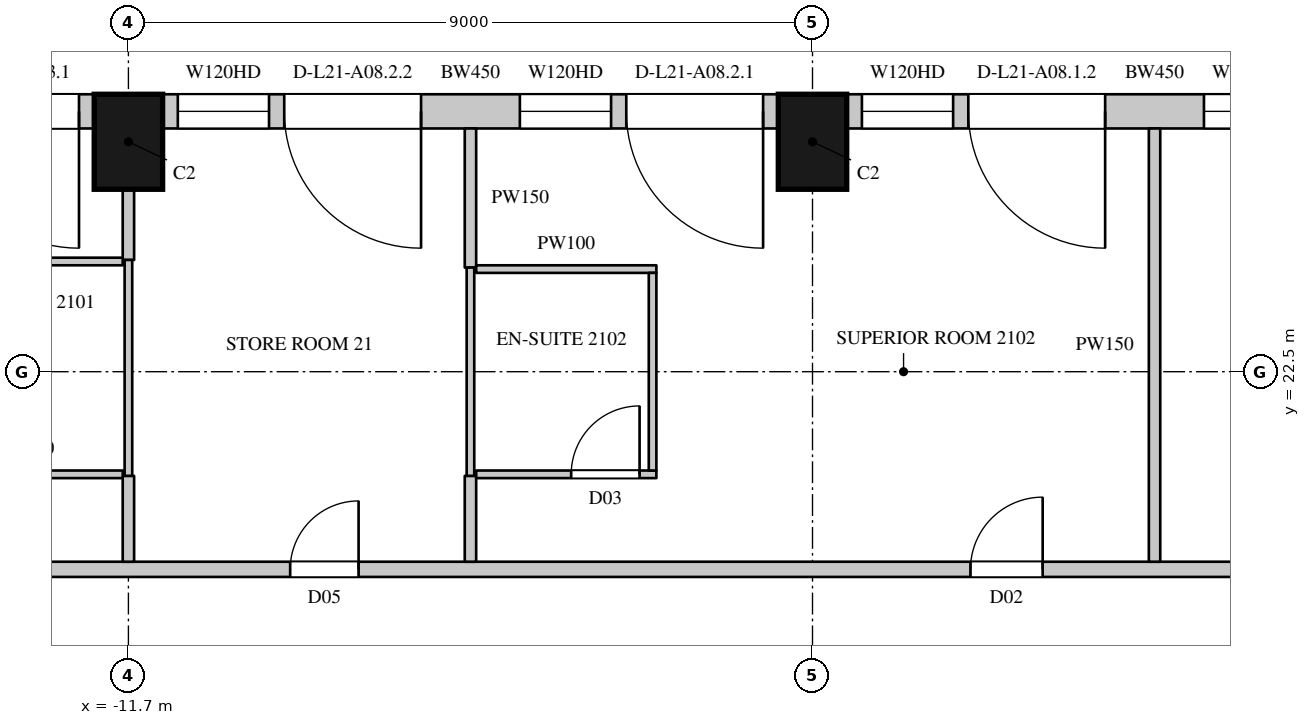
"""IFC4 building model, lengths in metres.
Left out: names, types, materials, properties, quantities, classifications, styles, units other than length and angle.
Written with IfcOpenShell. Run it as: python <this file> out.ifc"""

import sys

from ifc_helpers import new_model, si_unit, direction, frame, frame_2d, origin, origin_2d, place, context, subcontext, project, spatial, rectangle, extrude, element, fill, save


model = new_model("IFC4")
c1 = context("Model", 3, precision=1e-05, world=origin(), true_north=direction((0.0, 1.0)))
c2 = subcontext(c1, "Body", "Model", "MODEL_VIEW")
j1 = project(units=[si_unit("LENGTHUNIT", "METRE"), si_unit("PLANEANGLEUNIT", "RADIAN")], contexts=[c1])
p1 = place(None, origin())
s1 = spatial("IfcSite", under=j1, at=p1, CompositionType="ELEMENT")
p2 = place(p1, origin())
s2 = spatial("IfcBuilding", under=s1, at=p2, CompositionType="ELEMENT")
p3 = place(p2, frame((0.0, 0.0, 105.9)))
s3 = spatial("IfcBuildingStorey", under=s2, at=p3, CompositionType="ELEMENT", Elevation=105.9)
for number, where, z_axis, x_axis in (
    (1, (-2.7, 25.525, 0.0), (0.0, 0.0, 1.0), (-1.0, 0.0, 0.0)),
    (2, (-11.7, 25.525, 0.0), (0.0, 0.0, 1.0), (-1.0, 0.0, 0.0)),
):
    element("IfcColumn", number, at=place(p3, frame(where, z_axis=z_axis, x_axis=x_axis)), inside=s3, PredefinedType="COLUMN", context=c2, shape_type="SweptSolid", body=[
        extrude(rectangle(XDim=0.9, YDim=1.25, at=origin_2d()), origin(), (0.0, 0.0, 1.0), 3.6),
    ])
p4 = place(p3, frame((5.85, 25.925, 0.0), z_axis=(0.0, 0.0, 1.0), x_axis=(-1.0, 0.0, 0.0)))
e3 = element("IfcWall", 3, at=p4, inside=s3, PredefinedType="SOLIDWALL", context=c2, shape_type="SweptSolid", body=[
    extrude(rectangle(XDim=8.1, YDim=0.45, at=frame_2d((4.05, 0.0))), origin(), (0.0, 0.0, 1.0), 3.3),
])
p5 = place(p4, frame((0.2, 0.0, 0.0)))
e4 = element("IfcOpeningElement", 4, at=p5, cuts=e3, PredefinedType="OPENING", context=c2, shape_type="SweptSolid", body=[
    extrude(rectangle(XDim=1.8, YDim=2.4, at=frame_2d((0.9, 1.2))), frame((0.0, 0.235, 0.0), z_axis=(0.0, -1.0, 0.0), x_axis=(1.0, 0.0, 0.0)), (0.0, 0.0, 1.0), 0.47),
])
p6 = place(p4, frame((2.2, 0.0, 1.05)))
e5 = element("IfcOpeningElement", 5, at=p6, cuts=e3, PredefinedType="OPENING", context=c2, shape_type="SweptSolid", body=[
    extrude(rectangle(XDim=1.2, YDim=2.0, at=frame_2d((0.6, 1.0))), frame((0.0, 0.235, 0.0), z_axis=(0.0, -1.0, 0.0), x_axis=(1.0, 0.0, 0.0)), (0.0, 0.0, 1.0), 0.47),
])
p7 = place(p4, frame((4.7, 0.0, 0.0)))
e6 = element("IfcOpeningElement", 6, at=p7, cuts=e3, PredefinedType="OPENING", context=c2, shape_type="SweptSolid", body=[
    extrude(rectangle(XDim=1.8, YDim=2.4, at=frame_2d((0.9, 1.2))), frame((0.0, 0.235, 0.0), z_axis=(0.0, -1.0, 0.0), x_axis=(1.0, 0.0, 0.0)), (0.0, 0.0, 1.0), 0.47),
])
p8 = place(p4, frame((6.7, 0.0, 1.05)))
e7 = element("IfcOpeningElement", 7, at=p8, cuts=e3, PredefinedType="OPENING", context=c2, shape_type="SweptSolid", body=[
    extrude(rectangle(XDim=1.2, YDim=2.0, at=frame_2d((0.6, 1.0))), frame((0.0, 0.235, 0.0), z_axis=(0.0, -1.0, 0.0), x_axis=(1.0, 0.0, 0.0)), (0.0, 0.0, 1.0), 0.47),
])
p9 = place(p3, frame((-3.15, 25.925, 0.0), z_axis=(0.0, 0.0, 1.0), x_axis=(-1.0, 0.0, 0.0)))
e8 = element("IfcWall", 8, at=p9, inside=s3, PredefinedType="SOLIDWALL", context=c2, shape_type="SweptSolid", body=[
    extrude(rectangle(XDim=8.1, YDim=0.45, at=frame_2d((4.05, 0.0))), origin(), (0.0, 0.0, 1.0), 3.3),
])
p10 = place(p9, frame((0.2, 0.0, 0.0)))
e9 = element("IfcOpeningElement", 9, at=p10, cuts=e8, PredefinedType="OPENING", context=c2, shape_type="SweptSolid", body=[
    extrude(rectangle(XDim=1.8, YDim=2.4, at=frame_2d((0.9, 1.2))), frame((0.0, 0.235, 0.0), z_axis=(0.0, -1.0, 0.0), x_axis=(1.0, 0.0, 0.0)), (0.0, 0.0, 1.0), 0.47),
])
p11 = place(p9, frame((2.2, 0.0, 1.05)))
e10 = element("IfcOpeningElement", 10, at=p11, cuts=e8, PredefinedType="OPENING", context=c2, shape_type="SweptSolid", body=[
    extrude(rectangle(XDim=1.2, YDim=2.0, at=frame_2d((0.6, 1.0))), frame((0.0, 0.235, 0.0), z_axis=(0.0, -1.0, 0.0), x_axis=(1.0, 0.0, 0.0)), (0.0, 0.0, 1.0), 0.47),
])
p12 = place(p9, frame((4.7, 0.0, 0.0)))
e11 = element("IfcOpeningElement", 11, at=p12, cuts=e8, PredefinedType="OPENING", context=c2, shape_type="SweptSolid", body=[
    extrude(rectangle(XDim=1.8, YDim=2.4, at=frame_2d((0.9, 1.2))), frame((0.0, 0.235, 0.0), z_axis=(0.0, -1.0, 0.0), x_axis=(1.0, 0.0, 0.0)), (0.0, 0.0, 1.0), 0.47),
])
p13 = place(p9, frame((6.7, 0.0, 1.05)))
e12 = element("IfcOpeningElement", 12, at=p13, cuts=e8, PredefinedType="OPENING", context=c2, shape_type="SweptSolid", body=[
    extrude(rectangle(XDim=1.2, YDim=2.0, at=frame_2d((0.6, 1.0))), frame((0.0, 0.235, 0.0), z_axis=(0.0, -1.0, 0.0), x_axis=(1.0, 0.0, 0.0)), (0.0, 0.0, 1.0), 0.47),
])
p14 = place(p3, frame((-12.15, 25.925, 0.0), z_axis=(0.0, 0.0, 1.0), x_axis=(-1.0, 0.0, 0.0)))
e13 = element("IfcWall", 13, at=p14, inside=s3, PredefinedType="SOLIDWALL", context=c2, shape_type="SweptSolid", body=[
    extrude(rectangle(XDim=8.1, YDim=0.45, at=frame_2d((4.05, 0.0))), origin(), (0.0, 0.0, 1.0), 3.3),
])
p15 = place(p14, frame((0.2, 0.0, 0.0)))
e14 = element("IfcOpeningElement", 14, at=p15, cuts=e13, PredefinedType="OPENING", context=c2, shape_type="SweptSolid", body=[
    extrude(rectangle(XDim=1.8, YDim=2.4, at=frame_2d((0.9, 1.2))), frame((0.0, 0.235, 0.0), z_axis=(0.0, -1.0, 0.0), x_axis=(1.0, 0.0, 0.0)), (0.0, 0.0, 1.0), 0.47),
])
p16 = place(p14, frame((2.2, 0.0, 1.05)))
e15 = element("IfcOpeningElement", 15, at=p16, cuts=e13, PredefinedType="OPENING", context=c2, shape_type="SweptSolid", body=[
    extrude(rectangle(XDim=1.2, YDim=2.0, at=frame_2d((0.6, 1.0))), frame((0.0, 0.235, 0.0), z_axis=(0.0, -1.0, 0.0), x_axis=(1.0, 0.0, 0.0)), (0.0, 0.0, 1.0), 0.47),
])
p17 = place(p14, frame((4.0, 0.0, 0.0)))
e16 = element("IfcOpeningElement", 16, at=p17, cuts=e13, PredefinedType="OPENING", context=c2, shape_type="SweptSolid", body=[
    extrude(rectangle(XDim=1.8, YDim=2.4, at=frame_2d((0.9, 1.2))), frame((0.0, 0.235, 0.0), z_axis=(0.0, -1.0, 0.0), x_axis=(1.0, 0.0, 0.0)), (0.0, 0.0, 1.0), 0.47),
])
p18 = place(p3, frame((-23.822, 19.9, 0.0), z_axis=(0.0, 0.0, 1.0), x_axis=(1.0, 0.0, 0.0)))
e17 = element("IfcWall", 17, at=p18, inside=s3, PredefinedType="PARTITIONING", context=c2, shape_type="SweptSolid", body=[
    extrude(rectangle(XDim=41.605, YDim=0.2, at=frame_2d((20.803, 0.0))), origin(), (0.0, 0.0, 1.0), 3.3),
])
p19 = place(p18, frame((14.25, 0.0, 0.0)))
e18 = element("IfcOpeningElement", 18, at=p19, cuts=e17, PredefinedType="OPENING", context=c2, shape_type="SweptSolid", body=[
    extrude(rectangle(XDim=0.9, YDim=2.2, at=frame_2d((0.45, 1.1))), frame((0.0, 0.11, 0.0), z_axis=(0.0, -1.0, 0.0), x_axis=(1.0, 0.0, 0.0)), (0.0, 0.0, 1.0), 0.22),
])
p20 = place(p18, frame((27.1, 0.0, 0.0)))
e19 = element("IfcOpeningElement", 19, at=p20, cuts=e17, PredefinedType="OPENING", context=c2, shape_type="SweptSolid", body=[
    extrude(rectangle(XDim=0.9, YDim=2.2, at=frame_2d((0.45, 1.1))), frame((0.0, 0.11, 0.0), z_axis=(0.0, -1.0, 0.0), x_axis=(1.0, 0.0, 0.0)), (0.0, 0.0, 1.0), 0.22),
])
p21 = place(p18, frame((0.8, 0.0, 0.0)))
e20 = element("IfcOpeningElement", 20, at=p21, cuts=e17, PredefinedType="OPENING", context=c2, shape_type="SweptSolid", body=[
    extrude(rectangle(XDim=1.1, YDim=2.4, at=frame_2d((0.55, 1.2))), frame((0.0, 0.11, 0.0), z_axis=(0.0, -1.0, 0.0), x_axis=(1.0, 0.0, 0.0)), (0.0, 0.0, 1.0), 0.22),
])
p22 = place(p18, frame((23.2, 0.0, 0.0)))
e21 = element("IfcOpeningElement", 21, at=p22, cuts=e17, PredefinedType="OPENING", context=c2, shape_type="SweptSolid", body=[
    extrude(rectangle(XDim=0.95, YDim=2.2, at=frame_2d((0.475, 1.1))), frame((0.0, 0.11, 0.0), z_axis=(0.0, -1.0, 0.0), x_axis=(1.0, 0.0, 0.0)), (0.0, 0.0, 1.0), 0.22),
])
p23 = place(p18, frame((35.0, 0.0, 0.0)))
e22 = element("IfcOpeningElement", 22, at=p23, cuts=e17, PredefinedType="OPENING", context=c2, shape_type="SweptSolid", body=[
    extrude(rectangle(XDim=0.95, YDim=2.2, at=frame_2d((0.475, 1.1))), frame((0.0, 0.11, 0.0), z_axis=(0.0, -1.0, 0.0), x_axis=(1.0, 0.0, 0.0)), (0.0, 0.0, 1.0), 0.22),
])
p24 = place(p3, frame((-11.7, 20.0, 0.0), z_axis=(0.0, 0.0, 1.0), x_axis=(0.0, 1.0, 0.0)))
e23 = element("IfcWall", 23, at=p24, inside=s3, PredefinedType="PARTITIONING", context=c2, shape_type="SweptSolid", body=[
    extrude(rectangle(XDim=1.13, YDim=0.15, at=frame_2d((0.565, 0.0))), origin(), (0.0, 0.0, 1.0), 2.75),
])
p25 = place(p3, frame((-11.7, 23.97, 0.0), z_axis=(0.0, 0.0, 1.0), x_axis=(0.0, 1.0, 0.0)))
e24 = element("IfcWall", 24, at=p25, inside=s3, PredefinedType="PARTITIONING", context=c2, shape_type="SweptSolid", body=[
    extrude(rectangle(XDim=0.93, YDim=0.15, at=frame_2d((0.465, 0.0))), origin(), (0.0, 0.0, 1.0), 2.75),
])
p26 = place(p3, frame((-7.2, 20.0, 0.0), z_axis=(0.0, 0.0, 1.0), x_axis=(0.0, 1.0, 0.0)))
e25 = element("IfcWall", 25, at=p26, inside=s3, PredefinedType="PARTITIONING", context=c2, shape_type="SweptSolid", body=[
    extrude(rectangle(XDim=1.13, YDim=0.15, at=frame_2d((0.565, 0.0))), origin(), (0.0, 0.0, 1.0), 2.65),
])
p27 = place(p3, frame((-7.2, 23.87, 0.0), z_axis=(0.0, 0.0, 1.0), x_axis=(0.0, 1.0, 0.0)))
e26 = element("IfcWall", 26, at=p27, inside=s3, PredefinedType="PARTITIONING", context=c2, shape_type="SweptSolid", body=[
    extrude(rectangle(XDim=1.83, YDim=0.15, at=frame_2d((0.915, 0.0))), origin(), (0.0, 0.0, 1.0), 2.65),
])
p28 = place(p3, frame((1.8, 20.0, 0.0), z_axis=(0.0, 0.0, 1.0), x_axis=(0.0, 1.0, 0.0)))
e27 = element("IfcWall", 27, at=p28, inside=s3, PredefinedType="PARTITIONING", context=c2, shape_type="SweptSolid", body=[
    extrude(rectangle(XDim=5.7, YDim=0.15, at=frame_2d((2.85, 0.0))), origin(), (0.0, 0.0, 1.0), 2.65),
])
for number, where, z_axis, x_axis in (
    (28, (-14.346, 21.15, 0.0), (0.0, 0.0, 1.0), (1.0, 0.0, 0.0)),
    (29, (-14.346, 23.95, 0.0), (0.0, 0.0, 1.0), (1.0, 0.0, 0.0)),
):
    element("IfcWall", number, at=place(p3, frame(where, z_axis=z_axis, x_axis=x_axis)), inside=s3, PredefinedType="PARTITIONING", context=c2, shape_type="SweptSolid", body=[
        extrude(rectangle(XDim=2.571, YDim=0.1, at=frame_2d((1.286, 0.0))), origin(), (0.0, 0.0, 1.0), 3.3),
    ])
p29 = place(p3, frame((-11.7, 21.13, 0.0), z_axis=(0.0, 0.0, 1.0), x_axis=(0.0, 1.0, 0.0)))
e30 = element("IfcWall", 30, at=p29, inside=s3, PredefinedType="PARTITIONING", context=c2, shape_type="SweptSolid", body=[
    extrude(rectangle(XDim=2.84, YDim=0.1, at=frame_2d((1.42, 0.0))), origin(), (0.0, 0.0, 1.0), 2.75),
])
p30 = place(p3, frame((-7.2, 21.13, 0.0), z_axis=(0.0, 0.0, 1.0), x_axis=(0.0, 1.0, 0.0)))
e31 = element("IfcWall", 31, at=p30, inside=s3, PredefinedType="PARTITIONING", context=c2, shape_type="SweptSolid", body=[
    extrude(rectangle(XDim=2.74, YDim=0.1, at=frame_2d((1.37, 0.0))), origin(), (0.0, 0.0, 1.0), 2.65),
])
p31 = place(p3, frame((-7.125, 21.15, 0.0), z_axis=(0.0, 0.0, 1.0), x_axis=(1.0, 0.0, 0.0)))
e32 = element("IfcWall", 32, at=p31, inside=s3, PredefinedType="PARTITIONING", context=c2, shape_type="SweptSolid", body=[
    extrude(rectangle(XDim=2.371, YDim=0.1, at=frame_2d((1.186, 0.0))), origin(), (0.0, 0.0, 1.0), 3.3),
])
p32 = place(p31, frame((1.25, 0.0, 0.0)))
e33 = element("IfcOpeningElement", 33, at=p32, cuts=e32, PredefinedType="OPENING", context=c2, shape_type="SweptSolid", body=[
    extrude(rectangle(XDim=0.9, YDim=2.2, at=frame_2d((0.45, 1.1))), frame((0.0, 0.06, 0.0), z_axis=(0.0, -1.0, 0.0), x_axis=(1.0, 0.0, 0.0)), (0.0, 0.0, 1.0), 0.12),
])
p33 = place(p3, frame((-7.125, 23.85, 0.0), z_axis=(0.0, 0.0, 1.0), x_axis=(1.0, 0.0, 0.0)))
e34 = element("IfcWall", 34, at=p33, inside=s3, PredefinedType="PARTITIONING", context=c2, shape_type="SweptSolid", body=[
    extrude(rectangle(XDim=2.371, YDim=0.1, at=frame_2d((1.186, 0.0))), origin(), (0.0, 0.0, 1.0), 3.3),
])
p34 = place(p3, frame((-4.804, 21.2, 0.0), z_axis=(0.0, 0.0, 1.0), x_axis=(0.0, 1.0, 0.0)))
e35 = element("IfcWall", 35, at=p34, inside=s3, PredefinedType="PARTITIONING", context=c2, shape_type="SweptSolid", body=[
    extrude(rectangle(XDim=2.6, YDim=0.1, at=frame_2d((1.3, 0.0))), origin(), (0.0, 0.0, 1.0), 3.3),
])
p35 = place(p6, origin())
e36 = element("IfcWindow", 36, at=p35, inside=s3, PartitioningType="SINGLE_PANEL", PredefinedType="WINDOW", context=c2, shape_type="SweptSolid", body=[
    extrude(rectangle(XDim=1.2, YDim=2.0, at=frame_2d((0.6, 1.0))), frame((0.0, 0.135, 0.0), z_axis=(0.0, -1.0, 0.0), x_axis=(1.0, 0.0, 0.0)), (0.0, 0.0, 1.0), 0.06),
])
fill(e5, e36)
p36 = place(p7, origin())
e37 = element("IfcDoor", 37, at=p36, inside=s3, OperationType="SLIDING_TO_LEFT", PredefinedType="DOOR", context=c2, shape_type="SweptSolid", body=[
    extrude(rectangle(XDim=1.8, YDim=2.4, at=frame_2d((0.9, 1.2))), frame((0.0, 0.13, 0.0), z_axis=(0.0, -1.0, 0.0), x_axis=(1.0, 0.0, 0.0)), (0.0, 0.0, 1.0), 0.05),
])
fill(e6, e37)
p37 = place(p8, origin())
e38 = element("IfcWindow", 38, at=p37, inside=s3, PartitioningType="SINGLE_PANEL", PredefinedType="WINDOW", context=c2, shape_type="SweptSolid", body=[
    extrude(rectangle(XDim=1.2, YDim=2.0, at=frame_2d((0.6, 1.0))), frame((0.0, 0.135, 0.0), z_axis=(0.0, -1.0, 0.0), x_axis=(1.0, 0.0, 0.0)), (0.0, 0.0, 1.0), 0.06),
])
fill(e7, e38)
p38 = place(p10, origin())
e39 = element("IfcDoor", 39, at=p38, inside=s3, OperationType="SLIDING_TO_LEFT", PredefinedType="DOOR", context=c2, shape_type="SweptSolid", body=[
    extrude(rectangle(XDim=1.8, YDim=2.4, at=frame_2d((0.9, 1.2))), frame((0.0, 0.13, 0.0), z_axis=(0.0, -1.0, 0.0), x_axis=(1.0, 0.0, 0.0)), (0.0, 0.0, 1.0), 0.05),
])
fill(e9, e39)
p39 = place(p11, origin())
e40 = element("IfcWindow", 40, at=p39, inside=s3, PartitioningType="SINGLE_PANEL", PredefinedType="WINDOW", context=c2, shape_type="SweptSolid", body=[
    extrude(rectangle(XDim=1.2, YDim=2.0, at=frame_2d((0.6, 1.0))), frame((0.0, 0.135, 0.0), z_axis=(0.0, -1.0, 0.0), x_axis=(1.0, 0.0, 0.0)), (0.0, 0.0, 1.0), 0.06),
])
fill(e10, e40)
p40 = place(p12, origin())
e41 = element("IfcDoor", 41, at=p40, inside=s3, OperationType="SLIDING_TO_LEFT", PredefinedType="DOOR", context=c2, shape_type="SweptSolid", body=[
    extrude(rectangle(XDim=1.8, YDim=2.4, at=frame_2d((0.9, 1.2))), frame((0.0, 0.13, 0.0), z_axis=(0.0, -1.0, 0.0), x_axis=(1.0, 0.0, 0.0)), (0.0, 0.0, 1.0), 0.05),
])
fill(e11, e41)
p41 = place(p13, origin())
e42 = element("IfcWindow", 42, at=p41, inside=s3, PartitioningType="SINGLE_PANEL", PredefinedType="WINDOW", context=c2, shape_type="SweptSolid", body=[
    extrude(rectangle(XDim=1.2, YDim=2.0, at=frame_2d((0.6, 1.0))), frame((0.0, 0.135, 0.0), z_axis=(0.0, -1.0, 0.0), x_axis=(1.0, 0.0, 0.0)), (0.0, 0.0, 1.0), 0.06),
])
fill(e12, e42)
p42 = place(p15, origin())
e43 = element("IfcDoor", 43, at=p42, inside=s3, OperationType="SLIDING_TO_LEFT", PredefinedType="DOOR", context=c2, shape_type="SweptSolid", body=[
    extrude(rectangle(XDim=1.8, YDim=2.4, at=frame_2d((0.9, 1.2))), frame((0.0, 0.13, 0.0), z_axis=(0.0, -1.0, 0.0), x_axis=(1.0, 0.0, 0.0)), (0.0, 0.0, 1.0), 0.05),
])
fill(e14, e43)
p43 = place(p19, origin())
e44 = element("IfcDoor", 44, at=p43, inside=s3, OperationType="SINGLE_SWING_RIGHT", PredefinedType="DOOR", context=c2, shape_type="SweptSolid", body=[
    extrude(rectangle(XDim=0.9, YDim=2.2, at=frame_2d((0.45, 1.1))), frame((0.0, 0.025, 0.0), z_axis=(0.0, -1.0, 0.0), x_axis=(1.0, 0.0, 0.0)), (0.0, 0.0, 1.0), 0.05),
])
fill(e18, e44)
p44 = place(p22, origin())
e45 = element("IfcDoor", 45, at=p44, inside=s3, OperationType="SINGLE_SWING_RIGHT", PredefinedType="DOOR", context=c2, shape_type="SweptSolid", body=[
    extrude(rectangle(XDim=0.95, YDim=2.2, at=frame_2d((0.475, 1.1))), frame((0.0, 0.025, 0.0), z_axis=(0.0, -1.0, 0.0), x_axis=(1.0, 0.0, 0.0)), (0.0, 0.0, 1.0), 0.05),
])
fill(e21, e45)
p45 = place(p32, origin())
e46 = element("IfcDoor", 46, at=p45, inside=s3, OperationType="SINGLE_SWING_RIGHT", PredefinedType="DOOR", context=c2, shape_type="SweptSolid", body=[
    extrude(rectangle(XDim=0.9, YDim=2.2, at=frame_2d((0.45, 1.1))), frame((0.0, 0.025, 0.0), z_axis=(0.0, -1.0, 0.0), x_axis=(1.0, 0.0, 0.0)), (0.0, 0.0, 1.0), 0.05),
])
fill(e33, e46)
save(model, sys.argv[1])
